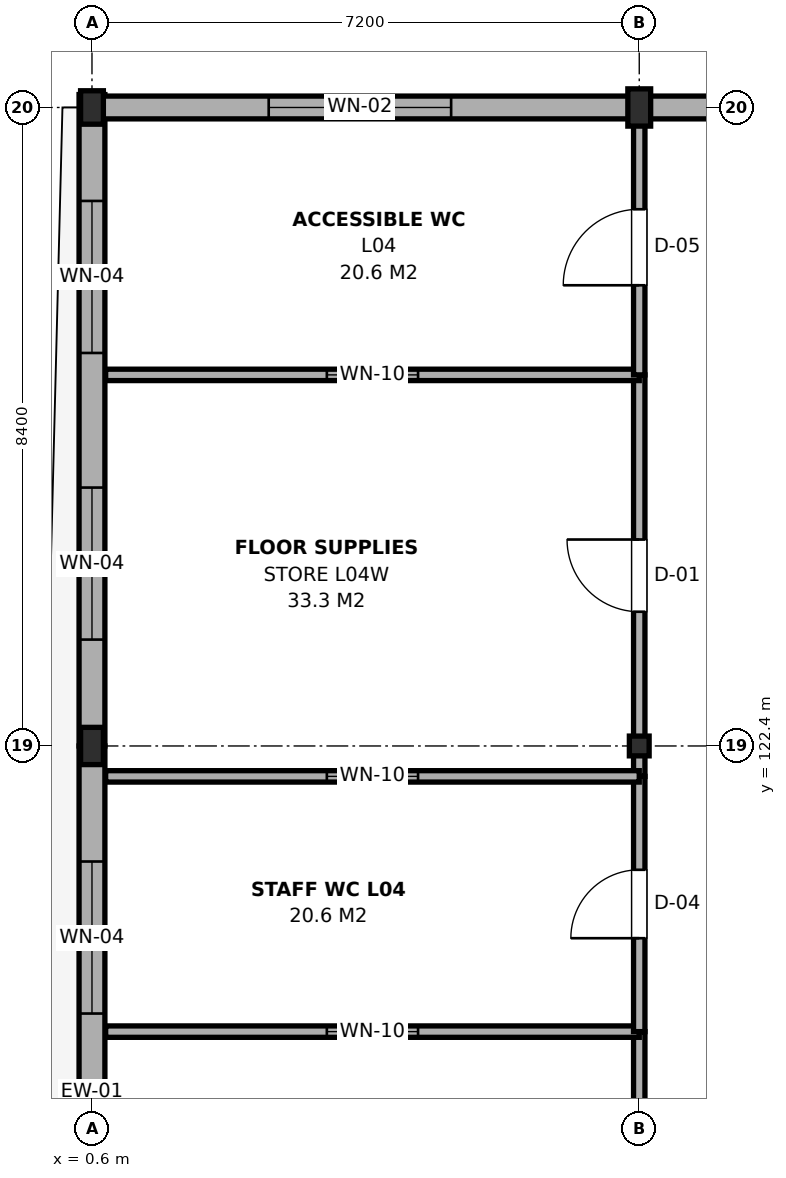
"""IFC4 building model, lengths in metres.
Left out: names, types, materials, properties, quantities, classifications, styles, units other than length and angle.
Written with IfcOpenShell. Run it as: python <this file> out.ifc"""

import sys

from ifc_helpers import new_model, si_unit, direction, frame, frame_2d, origin, origin_2d, place, context, subcontext, project, spatial, rectangle, i_section, extrude, element, fill, save


model = new_model("IFC4")
c1 = context("Model", 3, precision=1e-05, world=origin(), true_north=direction((0.0, 1.0)))
c2 = subcontext(c1, "Body", "Model", "MODEL_VIEW")
j1 = project(units=[si_unit("LENGTHUNIT", "METRE"), si_unit("PLANEANGLEUNIT", "RADIAN")], contexts=[c1])
p1 = place(None, origin())
s1 = spatial("IfcSite", under=j1, at=p1, CompositionType="ELEMENT")
p2 = place(p1, origin())
s2 = spatial("IfcBuilding", under=s1, at=p2, CompositionType="ELEMENT")
p3 = place(p2, frame((0.0, 0.0, 17.1)))
s3 = spatial("IfcBuildingStorey", under=s2, at=p3, CompositionType="ELEMENT", Elevation=17.1)
p4 = place(p3, frame((0.6, 122.4, 0.0), z_axis=(0.0, 0.0, 1.0), x_axis=(1.0, 0.0, 0.0)))
e1 = element("IfcColumn", 1, at=p4, inside=s3, PredefinedType="COLUMN", context=c2, shape_type="SweptSolid", body=[
    extrude(i_section(OverallWidth=0.3, OverallDepth=0.49, WebThickness=0.012, FlangeThickness=0.023, FilletRadius=0.027, at=origin_2d()), origin(), (0.0, 0.0, 1.0), 3.9),
])
p5 = place(p3, frame((0.6, 130.8, 0.0), z_axis=(0.0, 0.0, 1.0), x_axis=(1.0, 0.0, 0.0)))
e2 = element("IfcColumn", 2, at=p5, inside=s3, PredefinedType="COLUMN", context=c2, shape_type="SweptSolid", body=[
    extrude(i_section(OverallWidth=0.3, OverallDepth=0.44, WebThickness=0.011, FlangeThickness=0.021, FilletRadius=0.027, at=origin_2d()), origin(), (0.0, 0.0, 1.0), 3.9),
])
p6 = place(p3, frame((7.8, 122.4, 0.0), z_axis=(0.0, 0.0, 1.0), x_axis=(1.0, 0.0, 0.0)))
e3 = element("IfcColumn", 3, at=p6, inside=s3, PredefinedType="COLUMN", context=c2, shape_type="SweptSolid", body=[
    extrude(i_section(OverallWidth=0.26, OverallDepth=0.26, WebThickness=0.01, FlangeThickness=0.018, FilletRadius=0.024, at=origin_2d()), origin(), (0.0, 0.0, 1.0), 3.9),
])
p7 = place(p3, frame((7.8, 130.8, 0.0), z_axis=(0.0, 0.0, 1.0), x_axis=(1.0, 0.0, 0.0)))
e4 = element("IfcColumn", 4, at=p7, inside=s3, PredefinedType="COLUMN", context=c2, shape_type="SweptSolid", body=[
    extrude(i_section(OverallWidth=0.3, OverallDepth=0.49, WebThickness=0.012, FlangeThickness=0.023, FilletRadius=0.027, at=origin_2d()), origin(), (0.0, 0.0, 1.0), 3.9),
])
p8 = place(p3, frame((0.6, 113.4, 0.0), z_axis=(0.0, 0.0, 1.0), x_axis=(0.0, 1.0, 0.0)))
e5 = element("IfcWall", 5, at=p8, inside=s3, PredefinedType="SOLIDWALL", context=c2, shape_type="SweptSolid", body=[
    extrude(rectangle(XDim=9.0, YDim=0.34, at=frame_2d((4.5, 0.0))), origin(), (0.0, 0.0, 1.0), 3.205),
])
p9 = place(p8, frame((1.52, 0.0, 0.9)))
e6 = element("IfcOpeningElement", 6, at=p9, cuts=e5, PredefinedType="OPENING", context=c2, shape_type="SweptSolid", body=[
    extrude(rectangle(XDim=2.0, YDim=1.8, at=frame_2d((1.0, 0.9))), frame((0.0, 0.185, 0.0), z_axis=(0.0, -1.0, 0.0), x_axis=(1.0, 0.0, 0.0)), (0.0, 0.0, 1.0), 0.37),
])
p10 = place(p8, frame((5.48, 0.0, 0.9)))
e7 = element("IfcOpeningElement", 7, at=p10, cuts=e5, PredefinedType="OPENING", context=c2, shape_type="SweptSolid", body=[
    extrude(rectangle(XDim=2.0, YDim=1.8, at=frame_2d((1.0, 0.9))), frame((0.0, 0.185, 0.0), z_axis=(0.0, -1.0, 0.0), x_axis=(1.0, 0.0, 0.0)), (0.0, 0.0, 1.0), 0.37),
])
p11 = place(p3, frame((0.6, 122.4, 0.0), z_axis=(0.0, 0.0, 1.0), x_axis=(0.0, 1.0, 0.0)))
e8 = element("IfcWall", 8, at=p11, inside=s3, PredefinedType="SOLIDWALL", context=c2, shape_type="SweptSolid", body=[
    extrude(rectangle(XDim=8.57, YDim=0.34, at=frame_2d((4.285, 0.0))), origin(), (0.0, 0.0, 1.0), 3.255),
])
p12 = place(p11, frame((1.4, 0.0, 0.9)))
e9 = element("IfcOpeningElement", 9, at=p12, cuts=e8, PredefinedType="OPENING", context=c2, shape_type="SweptSolid", body=[
    extrude(rectangle(XDim=2.0, YDim=1.8, at=frame_2d((1.0, 0.9))), frame((0.0, 0.185, 0.0), z_axis=(0.0, -1.0, 0.0), x_axis=(1.0, 0.0, 0.0)), (0.0, 0.0, 1.0), 0.37),
])
p13 = place(p11, frame((5.17, 0.0, 0.9)))
e10 = element("IfcOpeningElement", 10, at=p13, cuts=e8, PredefinedType="OPENING", context=c2, shape_type="SweptSolid", body=[
    extrude(rectangle(XDim=2.0, YDim=1.8, at=frame_2d((1.0, 0.9))), frame((0.0, 0.185, 0.0), z_axis=(0.0, -1.0, 0.0), x_axis=(1.0, 0.0, 0.0)), (0.0, 0.0, 1.0), 0.37),
])
p14 = place(p3, frame((0.45, 130.8, 0.0), z_axis=(0.0, 0.0, 1.0), x_axis=(1.0, 0.0, 0.0)))
e11 = element("IfcWall", 11, at=p14, inside=s3, PredefinedType="SOLIDWALL", context=c2, shape_type="SweptSolid", body=[
    extrude(rectangle(XDim=7.35, YDim=0.3, at=frame_2d((3.675, 0.0))), origin(), (0.0, 0.0, 1.0), 3.195),
])
p15 = place(p14, frame((2.475, 0.0, 0.9)))
e12 = element("IfcOpeningElement", 12, at=p15, cuts=e11, PredefinedType="OPENING", context=c2, shape_type="SweptSolid", body=[
    extrude(rectangle(XDim=2.4, YDim=2.1, at=frame_2d((1.2, 1.05))), frame((0.0, 0.165, 0.0), z_axis=(0.0, -1.0, 0.0), x_axis=(1.0, 0.0, 0.0)), (0.0, 0.0, 1.0), 0.33),
])
p16 = place(p3, frame((7.8, 130.8, 0.0), z_axis=(0.0, 0.0, 1.0), x_axis=(1.0, 0.0, 0.0)))
e13 = element("IfcWall", 13, at=p16, inside=s3, PredefinedType="SOLIDWALL", context=c2, shape_type="SweptSolid", body=[
    extrude(rectangle(XDim=7.2, YDim=0.3, at=frame_2d((3.6, 0.0))), origin(), (0.0, 0.0, 1.0), 3.195),
])
p17 = place(p16, frame((3.35, 0.0, 0.9)))
e14 = element("IfcOpeningElement", 14, at=p17, cuts=e13, PredefinedType="OPENING", context=c2, shape_type="SweptSolid", body=[
    extrude(rectangle(XDim=2.4, YDim=2.1, at=frame_2d((1.2, 1.05))), frame((0.0, 0.165, 0.0), z_axis=(0.0, -1.0, 0.0), x_axis=(1.0, 0.0, 0.0)), (0.0, 0.0, 1.0), 0.33),
])
p18 = place(p3, frame((7.8, 113.4, 0.0), z_axis=(0.0, 0.0, 1.0), x_axis=(0.0, 1.0, 0.0)))
e15 = element("IfcWall", 15, at=p18, inside=s3, PredefinedType="PARTITIONING", context=c2, shape_type="SweptSolid", body=[
    extrude(rectangle(XDim=5.242, YDim=0.15, at=frame_2d((2.621, 0.0))), origin(), (0.0, 0.0, 1.0), 3.105),
])
p19 = place(p18, frame((2.146, 0.0, 0.0)))
e16 = element("IfcOpeningElement", 16, at=p19, cuts=e15, PredefinedType="OPENING", context=c2, shape_type="SweptSolid", body=[
    extrude(rectangle(XDim=0.95, YDim=2.15, at=frame_2d((0.475, 1.075))), frame((0.0, 0.09, 0.0), z_axis=(0.0, -1.0, 0.0), x_axis=(1.0, 0.0, 0.0)), (0.0, 0.0, 1.0), 0.18),
])
p20 = place(p3, frame((0.78, 118.642, 0.0), z_axis=(0.0, 0.0, 1.0), x_axis=(1.0, 0.0, 0.0)))
e17 = element("IfcWall", 17, at=p20, inside=s3, PredefinedType="PARTITIONING", context=c2, shape_type="SweptSolid", body=[
    extrude(rectangle(XDim=7.02, YDim=0.15, at=frame_2d((3.51, 0.0))), origin(), (0.0, 0.0, 1.0), 3.155),
])
p21 = place(p20, frame((2.91, 0.0, 0.95)))
e18 = element("IfcOpeningElement", 18, at=p21, cuts=e17, PredefinedType="OPENING", context=c2, shape_type="SweptSolid", body=[
    extrude(rectangle(XDim=1.2, YDim=1.5, at=frame_2d((0.6, 0.75))), frame((0.0, 0.09, 0.0), z_axis=(0.0, -1.0, 0.0), x_axis=(1.0, 0.0, 0.0)), (0.0, 0.0, 1.0), 0.18),
])
p22 = place(p3, frame((7.8, 118.642, 0.0), z_axis=(0.0, 0.0, 1.0), x_axis=(0.0, 1.0, 0.0)))
e19 = element("IfcWall", 19, at=p22, inside=s3, PredefinedType="PARTITIONING", context=c2, shape_type="SweptSolid", body=[
    extrude(rectangle(XDim=3.358, YDim=0.15, at=frame_2d((1.679, 0.0))), origin(), (0.0, 0.0, 1.0), 3.155),
])
p23 = place(p22, frame((1.229, 0.0, 0.0)))
e20 = element("IfcOpeningElement", 20, at=p23, cuts=e19, PredefinedType="OPENING", context=c2, shape_type="SweptSolid", body=[
    extrude(rectangle(XDim=0.9, YDim=2.15, at=frame_2d((0.45, 1.075))), frame((0.0, 0.09, 0.0), z_axis=(0.0, -1.0, 0.0), x_axis=(1.0, 0.0, 0.0)), (0.0, 0.0, 1.0), 0.18),
])
p24 = place(p3, frame((7.8, 122.0, 0.0), z_axis=(0.0, 0.0, 1.0), x_axis=(0.0, 1.0, 0.0)))
e21 = element("IfcWall", 21, at=p24, inside=s3, PredefinedType="PARTITIONING", context=c2, shape_type="SweptSolid", body=[
    extrude(rectangle(XDim=5.282, YDim=0.15, at=frame_2d((2.641, 0.0))), origin(), (0.0, 0.0, 1.0), 3.145),
])
p25 = place(p24, frame((2.166, 0.0, 0.0)))
e22 = element("IfcOpeningElement", 22, at=p25, cuts=e21, PredefinedType="OPENING", context=c2, shape_type="SweptSolid", body=[
    extrude(rectangle(XDim=0.95, YDim=2.15, at=frame_2d((0.475, 1.075))), frame((0.0, 0.09, 0.0), z_axis=(0.0, -1.0, 0.0), x_axis=(1.0, 0.0, 0.0)), (0.0, 0.0, 1.0), 0.18),
])
p26 = place(p3, frame((0.78, 127.282, 0.0), z_axis=(0.0, 0.0, 1.0), x_axis=(1.0, 0.0, 0.0)))
e23 = element("IfcWall", 23, at=p26, inside=s3, PredefinedType="PARTITIONING", context=c2, shape_type="SweptSolid", body=[
    extrude(rectangle(XDim=7.02, YDim=0.15, at=frame_2d((3.51, 0.0))), origin(), (0.0, 0.0, 1.0), 3.205),
])
p27 = place(p26, frame((2.91, 0.0, 0.95)))
e24 = element("IfcOpeningElement", 24, at=p27, cuts=e23, PredefinedType="OPENING", context=c2, shape_type="SweptSolid", body=[
    extrude(rectangle(XDim=1.2, YDim=1.5, at=frame_2d((0.6, 0.75))), frame((0.0, 0.09, 0.0), z_axis=(0.0, -1.0, 0.0), x_axis=(1.0, 0.0, 0.0)), (0.0, 0.0, 1.0), 0.18),
])
p28 = place(p3, frame((7.8, 127.282, 0.0), z_axis=(0.0, 0.0, 1.0), x_axis=(0.0, 1.0, 0.0)))
e25 = element("IfcWall", 25, at=p28, inside=s3, PredefinedType="PARTITIONING", context=c2, shape_type="SweptSolid", body=[
    extrude(rectangle(XDim=3.358, YDim=0.15, at=frame_2d((1.679, 0.0))), origin(), (0.0, 0.0, 1.0), 3.195),
])
p29 = place(p28, frame((1.179, 0.0, 0.0)))
e26 = element("IfcOpeningElement", 26, at=p29, cuts=e25, PredefinedType="OPENING", context=c2, shape_type="SweptSolid", body=[
    extrude(rectangle(XDim=1.0, YDim=2.15, at=frame_2d((0.5, 1.075))), frame((0.0, 0.09, 0.0), z_axis=(0.0, -1.0, 0.0), x_axis=(1.0, 0.0, 0.0)), (0.0, 0.0, 1.0), 0.18),
])
p30 = place(p3, frame((0.78, 122.0, 0.0), z_axis=(0.0, 0.0, 1.0), x_axis=(1.0, 0.0, 0.0)))
e27 = element("IfcWall", 27, at=p30, inside=s3, PredefinedType="PARTITIONING", context=c2, shape_type="SweptSolid", body=[
    extrude(rectangle(XDim=7.02, YDim=0.15, at=frame_2d((3.51, 0.0))), origin(), (0.0, 0.0, 1.0), 3.155),
])
p31 = place(p30, frame((2.91, 0.0, 0.95)))
e28 = element("IfcOpeningElement", 28, at=p31, cuts=e27, PredefinedType="OPENING", context=c2, shape_type="SweptSolid", body=[
    extrude(rectangle(XDim=1.2, YDim=1.5, at=frame_2d((0.6, 0.75))), frame((0.0, 0.09, 0.0), z_axis=(0.0, -1.0, 0.0), x_axis=(1.0, 0.0, 0.0)), (0.0, 0.0, 1.0), 0.18),
])
p32 = place(p10, origin())
e29 = element("IfcWindow", 29, at=p32, inside=s3, PartitioningType="SINGLE_PANEL", PredefinedType="WINDOW", context=c2, shape_type="SweptSolid", body=[
    extrude(rectangle(XDim=2.0, YDim=1.8, at=frame_2d((1.0, 0.9))), frame((0.0, 0.03, 0.0), z_axis=(0.0, -1.0, 0.0), x_axis=(1.0, 0.0, 0.0)), (0.0, 0.0, 1.0), 0.06),
])
fill(e7, e29)
p33 = place(p12, origin())
e30 = element("IfcWindow", 30, at=p33, inside=s3, PartitioningType="SINGLE_PANEL", PredefinedType="WINDOW", context=c2, shape_type="SweptSolid", body=[
    extrude(rectangle(XDim=2.0, YDim=1.8, at=frame_2d((1.0, 0.9))), frame((0.0, 0.03, 0.0), z_axis=(0.0, -1.0, 0.0), x_axis=(1.0, 0.0, 0.0)), (0.0, 0.0, 1.0), 0.06),
])
fill(e9, e30)
p34 = place(p13, origin())
e31 = element("IfcWindow", 31, at=p34, inside=s3, PartitioningType="SINGLE_PANEL", PredefinedType="WINDOW", context=c2, shape_type="SweptSolid", body=[
    extrude(rectangle(XDim=2.0, YDim=1.8, at=frame_2d((1.0, 0.9))), frame((0.0, 0.03, 0.0), z_axis=(0.0, -1.0, 0.0), x_axis=(1.0, 0.0, 0.0)), (0.0, 0.0, 1.0), 0.06),
])
fill(e10, e31)
p35 = place(p15, origin())
e32 = element("IfcWindow", 32, at=p35, inside=s3, PartitioningType="SINGLE_PANEL", PredefinedType="WINDOW", context=c2, shape_type="SweptSolid", body=[
    extrude(rectangle(XDim=2.4, YDim=2.1, at=frame_2d((1.2, 1.05))), frame((0.0, 0.03, 0.0), z_axis=(0.0, -1.0, 0.0), x_axis=(1.0, 0.0, 0.0)), (0.0, 0.0, 1.0), 0.06),
])
fill(e12, e32)
p36 = place(p21, origin())
e33 = element("IfcWindow", 33, at=p36, inside=s3, PartitioningType="SINGLE_PANEL", PredefinedType="WINDOW", context=c2, shape_type="SweptSolid", body=[
    extrude(rectangle(XDim=1.2, YDim=1.5, at=frame_2d((0.6, 0.75))), frame((0.0, 0.03, 0.0), z_axis=(0.0, -1.0, 0.0), x_axis=(1.0, 0.0, 0.0)), (0.0, 0.0, 1.0), 0.06),
])
fill(e18, e33)
p37 = place(p23, origin())
e34 = element("IfcDoor", 34, at=p37, inside=s3, OperationType="SINGLE_SWING_LEFT", PredefinedType="DOOR", context=c2, shape_type="SweptSolid", body=[
    extrude(rectangle(XDim=0.9, YDim=2.15, at=frame_2d((0.45, 1.075))), frame((0.0, 0.025, 0.0), z_axis=(0.0, -1.0, 0.0), x_axis=(1.0, 0.0, 0.0)), (0.0, 0.0, 1.0), 0.05),
])
fill(e20, e34)
p38 = place(p25, origin())
e35 = element("IfcDoor", 35, at=p38, inside=s3, OperationType="SINGLE_SWING_RIGHT", PredefinedType="DOOR", context=c2, shape_type="SweptSolid", body=[
    extrude(rectangle(XDim=0.95, YDim=2.15, at=frame_2d((0.475, 1.075))), frame((0.0, 0.025, 0.0), z_axis=(0.0, -1.0, 0.0), x_axis=(1.0, 0.0, 0.0)), (0.0, 0.0, 1.0), 0.05),
])
fill(e22, e35)
p39 = place(p27, origin())
e36 = element("IfcWindow", 36, at=p39, inside=s3, PartitioningType="SINGLE_PANEL", PredefinedType="WINDOW", context=c2, shape_type="SweptSolid", body=[
    extrude(rectangle(XDim=1.2, YDim=1.5, at=frame_2d((0.6, 0.75))), frame((0.0, 0.03, 0.0), z_axis=(0.0, -1.0, 0.0), x_axis=(1.0, 0.0, 0.0)), (0.0, 0.0, 1.0), 0.06),
])
fill(e24, e36)
p40 = place(p29, origin())
e37 = element("IfcDoor", 37, at=p40, inside=s3, OperationType="SINGLE_SWING_LEFT", PredefinedType="DOOR", context=c2, shape_type="SweptSolid", body=[
    extrude(rectangle(XDim=1.0, YDim=2.15, at=frame_2d((0.5, 1.075))), frame((0.0, 0.025, 0.0), z_axis=(0.0, -1.0, 0.0), x_axis=(1.0, 0.0, 0.0)), (0.0, 0.0, 1.0), 0.05),
])
fill(e26, e37)
p41 = place(p31, origin())
e38 = element("IfcWindow", 38, at=p41, inside=s3, PartitioningType="SINGLE_PANEL", PredefinedType="WINDOW", context=c2, shape_type="SweptSolid", body=[
    extrude(rectangle(XDim=1.2, YDim=1.5, at=frame_2d((0.6, 0.75))), frame((0.0, 0.03, 0.0), z_axis=(0.0, -1.0, 0.0), x_axis=(1.0, 0.0, 0.0)), (0.0, 0.0, 1.0), 0.06),
])
fill(e28, e38)
save(model, sys.argv[1])
